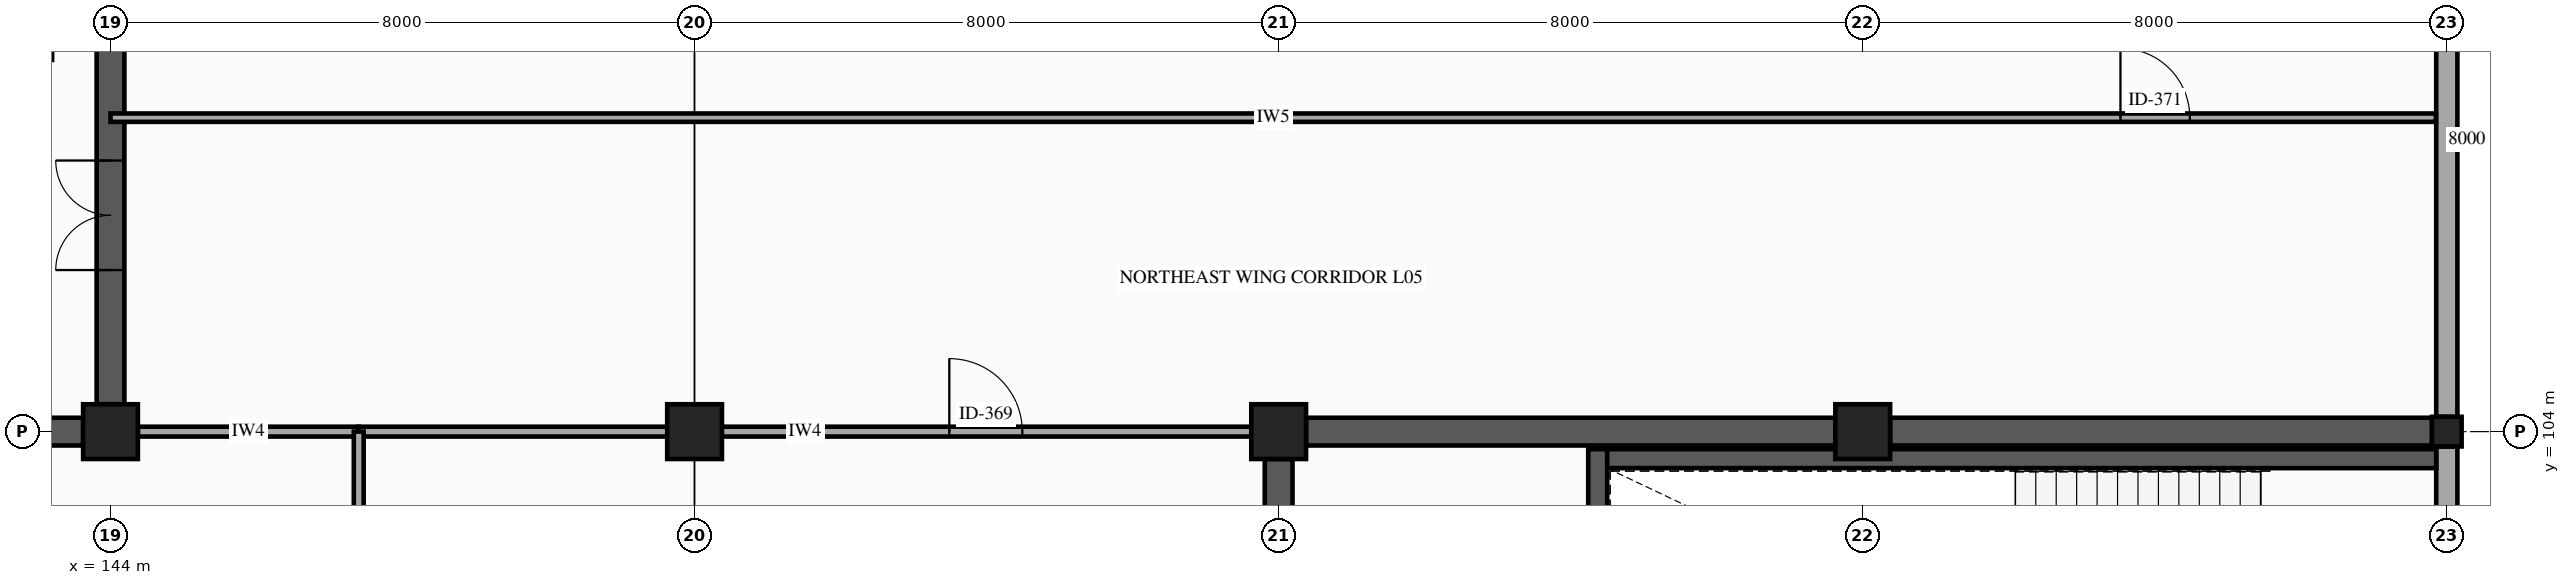
"""IFC4 building model, lengths in metres.
Left out: names, types, materials, properties, quantities, classifications, styles, units other than length and angle.
Written with IfcOpenShell. Run it as: python <this file> out.ifc"""

import sys

from ifc_helpers import new_model, si_unit, direction, frame, frame_2d, origin, origin_2d, place, context, subcontext, project, spatial, rectangle, hollow_rectangle, extrude, element, fill, save


model = new_model("IFC4")
c1 = context("Model", 3, precision=1e-05, world=origin(), true_north=direction((0.0, 1.0)))
c2 = subcontext(c1, "Body", "Model", "MODEL_VIEW")
j1 = project(units=[si_unit("LENGTHUNIT", "METRE"), si_unit("PLANEANGLEUNIT", "RADIAN")], contexts=[c1])
p1 = place(None, origin())
s1 = spatial("IfcSite", under=j1, at=p1, CompositionType="ELEMENT")
p2 = place(p1, origin())
s2 = spatial("IfcBuilding", under=s1, at=p2, CompositionType="ELEMENT")
p3 = place(p2, frame((0.0, 0.0, 23.9)))
s3 = spatial("IfcBuildingStorey", under=s2, at=p3, CompositionType="ELEMENT", Elevation=23.9)
for number, where, z_axis, x_axis in (
    (1, (144.0, 104.0, 0.0), (0.0, 0.0, 1.0), (1.0, 0.0, 0.0)),
    (2, (152.0, 104.0, 0.0), (0.0, 0.0, 1.0), (1.0, 0.0, 0.0)),
    (3, (160.0, 104.0, 0.0), (0.0, 0.0, 1.0), (1.0, 0.0, 0.0)),
    (4, (168.0, 104.0, 0.0), (0.0, 0.0, 1.0), (1.0, 0.0, 0.0)),
):
    element("IfcColumn", number, at=place(p3, frame(where, z_axis=z_axis, x_axis=x_axis)), inside=s3, PredefinedType="COLUMN", context=c2, shape_type="SweptSolid", body=[
        extrude(rectangle(XDim=0.75, YDim=0.75, at=origin_2d()), origin(), (0.0, 0.0, 1.0), 4.5),
    ])
p4 = place(p3, frame((176.0, 104.0, 0.0), z_axis=(0.0, 0.0, 1.0), x_axis=(1.0, 0.0, 0.0)))
e5 = element("IfcColumn", 5, at=p4, inside=s3, PredefinedType="COLUMN", context=c2, shape_type="SweptSolid", body=[
    extrude(hollow_rectangle(XDim=0.406, YDim=0.406, WallThickness=0.015, InnerFilletRadius=0.015, OuterFilletRadius=0.029, at=origin_2d()), origin(), (0.0, 0.0, 1.0), 4.5),
])
for number, where, z_axis, x_axis in (
    (6, (176.0, 111.797, 0.0), (0.0, 0.0, 1.0), (0.0, -1.0, 0.0)),
    (7, (176.0, 103.797, 0.0), (0.0, 0.0, 1.0), (0.0, -1.0, 0.0)),
):
    element("IfcWall", number, at=place(p3, frame(where, z_axis=z_axis, x_axis=x_axis)), inside=s3, PredefinedType="STANDARD", context=c2, shape_type="SweptSolid", body=[
        extrude(rectangle(XDim=7.594, YDim=0.29, at=frame_2d((3.797, 0.0))), origin(), (0.0, 0.0, 1.0), 3.48),
    ])
p5 = place(p3, frame((136.375, 104.0, 0.0), z_axis=(0.0, 0.0, 1.0), x_axis=(1.0, 0.0, 0.0)))
e8 = element("IfcWall", 8, at=p5, inside=s3, PredefinedType="SHEAR", context=c2, shape_type="SweptSolid", body=[
    extrude(rectangle(XDim=7.25, YDim=0.38, at=frame_2d((3.625, 0.0))), origin(), (0.0, 0.0, 1.0), 4.28),
])
p6 = place(p5, frame((2.875, 0.0, 0.0)))
e9 = element("IfcOpeningElement", 9, at=p6, cuts=e8, PredefinedType="OPENING", context=c2, shape_type="SweptSolid", body=[
    extrude(rectangle(XDim=1.5, YDim=2.15, at=frame_2d((0.75, 1.075))), frame((0.0, 0.2, 0.0), z_axis=(0.0, -1.0, 0.0), x_axis=(1.0, 0.0, 0.0)), (0.0, 0.0, 1.0), 0.4),
])
p7 = place(p3, frame((144.0, 104.375, 0.0), z_axis=(0.0, 0.0, 1.0), x_axis=(0.0, 1.0, 0.0)))
e10 = element("IfcWall", 10, at=p7, inside=s3, PredefinedType="SHEAR", context=c2, shape_type="SweptSolid", body=[
    extrude(rectangle(XDim=7.25, YDim=0.38, at=frame_2d((3.625, 0.0))), origin(), (0.0, 0.0, 1.0), 4.28),
])
p8 = place(p7, frame((1.838, 0.0, 0.0)))
e11 = element("IfcOpeningElement", 11, at=p8, cuts=e10, PredefinedType="OPENING", context=c2, shape_type="SweptSolid", body=[
    extrude(rectangle(XDim=1.5, YDim=2.15, at=frame_2d((0.75, 1.075))), frame((0.0, 0.2, 0.0), z_axis=(0.0, -1.0, 0.0), x_axis=(1.0, 0.0, 0.0)), (0.0, 0.0, 1.0), 0.4),
])
p9 = place(p3, frame((164.37, 98.99, 0.0), z_axis=(0.0, 0.0, 1.0), x_axis=(0.0, 1.0, 0.0)))
e12 = element("IfcWall", 12, at=p9, inside=s3, PredefinedType="SHEAR", context=c2, shape_type="SweptSolid", body=[
    extrude(rectangle(XDim=4.77, YDim=0.26, at=frame_2d((2.385, 0.0))), origin(), (0.0, 0.0, 1.0), 4.28),
])
p10 = place(p3, frame((164.5, 103.63, 0.0), z_axis=(0.0, 0.0, 1.0), x_axis=(1.0, 0.0, 0.0)))
e13 = element("IfcWall", 13, at=p10, inside=s3, PredefinedType="SHEAR", context=c2, shape_type="SweptSolid", body=[
    extrude(rectangle(XDim=11.355, YDim=0.26, at=frame_2d((5.677, 0.0))), origin(), (0.0, 0.0, 1.0), 4.28),
])
p11 = place(p3, frame((160.375, 104.0, 0.0), z_axis=(0.0, 0.0, 1.0), x_axis=(1.0, 0.0, 0.0)))
e14 = element("IfcWall", 14, at=p11, inside=s3, PredefinedType="SHEAR", context=c2, shape_type="SweptSolid", body=[
    extrude(rectangle(XDim=7.25, YDim=0.38, at=frame_2d((3.625, 0.0))), origin(), (0.0, 0.0, 1.0), 4.28),
])
p12 = place(p3, frame((168.375, 104.0, 0.0), z_axis=(0.0, 0.0, 1.0), x_axis=(1.0, 0.0, 0.0)))
e15 = element("IfcWall", 15, at=p12, inside=s3, PredefinedType="SHEAR", context=c2, shape_type="SweptSolid", body=[
    extrude(rectangle(XDim=7.422, YDim=0.38, at=frame_2d((3.711, 0.0))), origin(), (0.0, 0.0, 1.0), 4.28),
])
p13 = place(p3, frame((160.0, 96.375, 0.0), z_axis=(0.0, 0.0, 1.0), x_axis=(0.0, 1.0, 0.0)))
e16 = element("IfcWall", 16, at=p13, inside=s3, PredefinedType="SHEAR", context=c2, shape_type="SweptSolid", body=[
    extrude(rectangle(XDim=7.25, YDim=0.38, at=frame_2d((3.625, 0.0))), origin(), (0.0, 0.0, 1.0), 4.28),
])
p14 = place(p3, frame((144.375, 104.0, 0.0), z_axis=(0.0, 0.0, 1.0), x_axis=(1.0, 0.0, 0.0)))
e17 = element("IfcWall", 17, at=p14, inside=s3, PredefinedType="PARTITIONING", context=c2, shape_type="SweptSolid", body=[
    extrude(rectangle(XDim=3.025, YDim=0.135, at=frame_2d((1.512, 0.0))), origin(), (0.0, 0.0, 1.0), 3.48),
])
p15 = place(p3, frame((147.4, 104.0, 0.0), z_axis=(0.0, 0.0, 1.0), x_axis=(1.0, 0.0, 0.0)))
e18 = element("IfcWall", 18, at=p15, inside=s3, PredefinedType="PARTITIONING", context=c2, shape_type="SweptSolid", body=[
    extrude(rectangle(XDim=12.225, YDim=0.135, at=frame_2d((6.113, 0.0))), origin(), (0.0, 0.0, 1.0), 3.48),
])
p16 = place(p15, frame((8.089, 0.0, 0.0)))
e19 = element("IfcOpeningElement", 19, at=p16, cuts=e18, PredefinedType="OPENING", context=c2, shape_type="SweptSolid", body=[
    extrude(rectangle(XDim=1.0, YDim=2.15, at=frame_2d((0.5, 1.075))), frame((0.0, 0.077, 0.0), z_axis=(0.0, -1.0, 0.0), x_axis=(1.0, 0.0, 0.0)), (0.0, 0.0, 1.0), 0.155),
])
p17 = place(p3, frame((147.4, 88.15, 0.0), z_axis=(0.0, 0.0, 1.0), x_axis=(0.0, 1.0, 0.0)))
e20 = element("IfcWall", 20, at=p17, inside=s3, PredefinedType="PARTITIONING", context=c2, shape_type="SweptSolid", body=[
    extrude(rectangle(XDim=15.85, YDim=0.135, at=frame_2d((7.925, 0.0))), origin(), (0.0, 0.0, 1.0), 3.48),
])
p18 = place(p17, frame((3.18, 0.0, 0.0)))
e21 = element("IfcOpeningElement", 21, at=p18, cuts=e20, PredefinedType="OPENING", context=c2, shape_type="SweptSolid", body=[
    extrude(rectangle(XDim=1.0, YDim=2.15, at=frame_2d((0.5, 1.075))), frame((0.0, 0.077, 0.0), z_axis=(0.0, -1.0, 0.0), x_axis=(1.0, 0.0, 0.0)), (0.0, 0.0, 1.0), 0.155),
])
p19 = place(p3, frame((144.0, 108.3, 0.0), z_axis=(0.0, 0.0, 1.0), x_axis=(1.0, 0.0, 0.0)))
e22 = element("IfcWall", 22, at=p19, inside=s3, PredefinedType="PARTITIONING", context=c2, shape_type="SweptSolid", body=[
    extrude(rectangle(XDim=31.85, YDim=0.115, at=frame_2d((15.925, 0.0))), origin(), (0.0, 0.0, 1.0), 3.48),
])
p20 = place(p19, frame((27.53, 0.0, 0.0)))
e23 = element("IfcOpeningElement", 23, at=p20, cuts=e22, PredefinedType="OPENING", context=c2, shape_type="SweptSolid", body=[
    extrude(rectangle(XDim=0.95, YDim=2.1, at=frame_2d((0.475, 1.05))), frame((0.0, 0.067, 0.0), z_axis=(0.0, -1.0, 0.0), x_axis=(1.0, 0.0, 0.0)), (0.0, 0.0, 1.0), 0.135),
])
p21 = place(p8, origin())
e24 = element("IfcDoor", 24, at=p21, inside=s3, OperationType="DOUBLE_DOOR_SINGLE_SWING", PredefinedType="DOOR", context=c2, shape_type="SweptSolid", body=[
    extrude(rectangle(XDim=1.5, YDim=2.15, at=frame_2d((0.75, 1.075))), frame((0.0, 0.025, 0.0), z_axis=(0.0, -1.0, 0.0), x_axis=(1.0, 0.0, 0.0)), (0.0, 0.0, 1.0), 0.05),
])
fill(e11, e24)
p22 = place(p16, origin())
e25 = element("IfcDoor", 25, at=p22, inside=s3, OperationType="SINGLE_SWING_LEFT", PredefinedType="DOOR", context=c2, shape_type="SweptSolid", body=[
    extrude(rectangle(XDim=1.0, YDim=2.15, at=frame_2d((0.5, 1.075))), frame((0.0, 0.025, 0.0), z_axis=(0.0, -1.0, 0.0), x_axis=(1.0, 0.0, 0.0)), (0.0, 0.0, 1.0), 0.05),
])
fill(e19, e25)
p23 = place(p20, origin())
e26 = element("IfcDoor", 26, at=p23, inside=s3, OperationType="SINGLE_SWING_LEFT", PredefinedType="DOOR", context=c2, shape_type="SweptSolid", body=[
    extrude(rectangle(XDim=0.95, YDim=2.1, at=frame_2d((0.475, 1.05))), frame((0.0, 0.025, 0.0), z_axis=(0.0, -1.0, 0.0), x_axis=(1.0, 0.0, 0.0)), (0.0, 0.0, 1.0), 0.05),
])
fill(e23, e26)
save(model, sys.argv[1])
